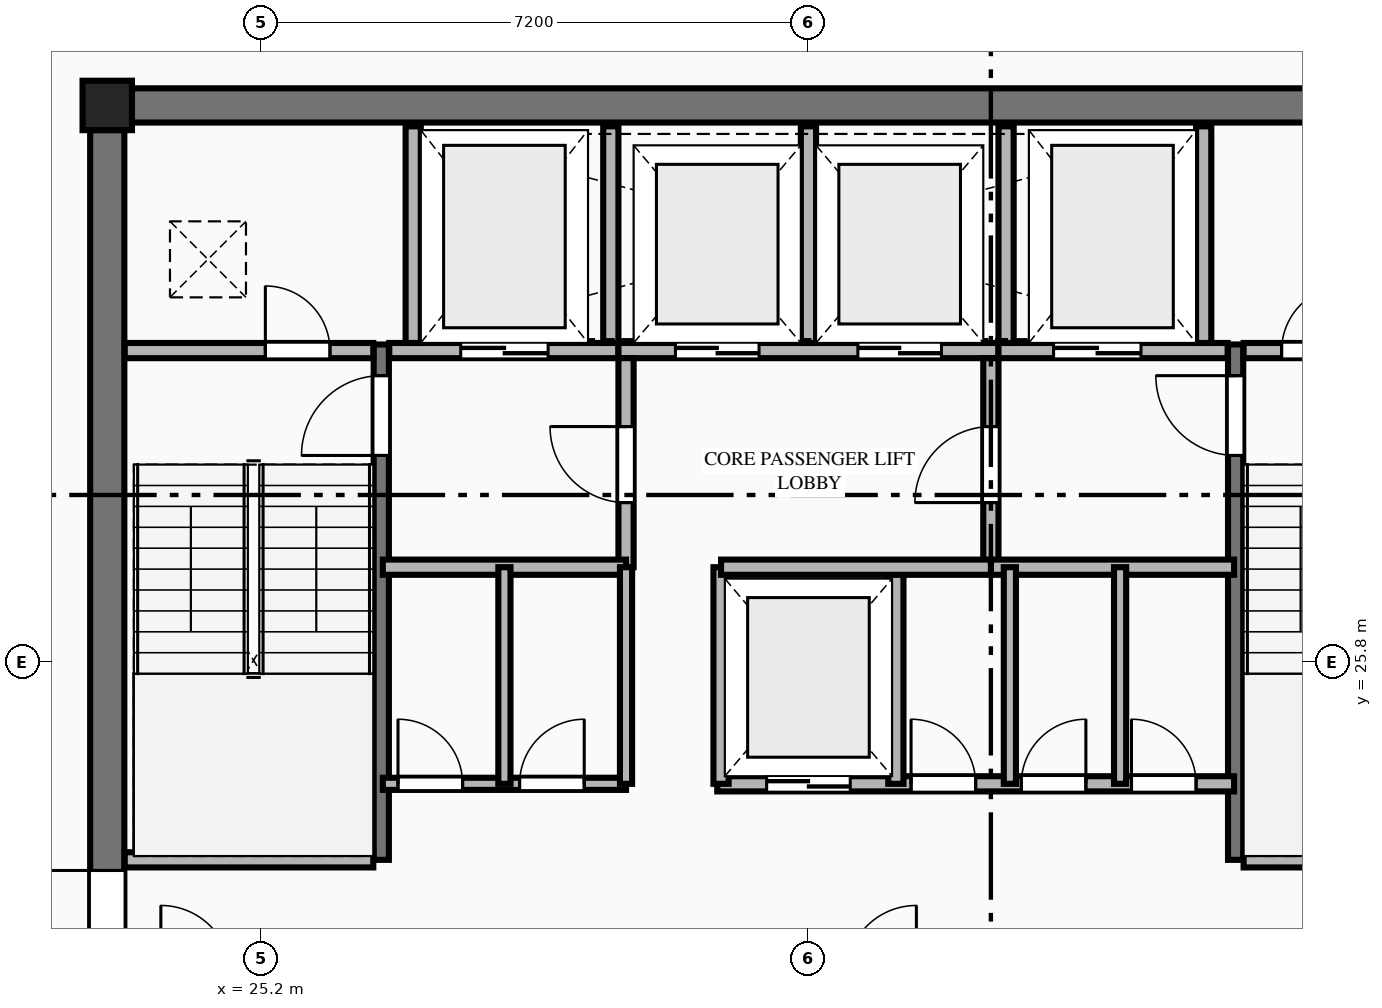
"""IFC4 building model, lengths in metres.
Left out: names, types, materials, properties, quantities, classifications, styles, units other than length and angle.
Written with IfcOpenShell. Run it as: python <this file> out.ifc"""

import sys

from ifc_helpers import new_model, si_unit, direction, frame, frame_2d, origin, origin_2d, place, context, subcontext, project, spatial, rectangle, extrude, element, fill, save


model = new_model("IFC4")
c1 = context("Model", 3, precision=1e-05, world=origin(), true_north=direction((0.0, 1.0)))
c2 = subcontext(c1, "Body", "Model", "MODEL_VIEW")
j1 = project(units=[si_unit("LENGTHUNIT", "METRE"), si_unit("PLANEANGLEUNIT", "RADIAN")], contexts=[c1])
p1 = place(None, origin())
s1 = spatial("IfcSite", under=j1, at=p1, CompositionType="ELEMENT")
p2 = place(p1, origin())
s2 = spatial("IfcBuilding", under=s1, at=p2, CompositionType="ELEMENT")
p3 = place(p2, frame((0.0, 0.0, 230.65)))
s3 = spatial("IfcBuildingStorey", under=s2, at=p3, CompositionType="ELEMENT", Elevation=230.65)
p4 = place(p3, frame((23.175, 33.125, 0.0), z_axis=(0.0, 0.0, 1.0), x_axis=(1.0, 0.0, 0.0)))
e1 = element("IfcColumn", 1, at=p4, inside=s3, PredefinedType="COLUMN", context=c2, shape_type="SweptSolid", body=[
    extrude(rectangle(XDim=0.65, YDim=0.65, at=origin_2d()), origin(), (0.0, 0.0, 1.0), 3.65),
])
p5 = place(p3, frame((23.5, 33.125, 0.0), z_axis=(0.0, 0.0, 1.0), x_axis=(1.0, 0.0, 0.0)))
e2 = element("IfcWall", 2, at=p5, inside=s3, PredefinedType="SHEAR", context=c2, shape_type="SweptSolid", body=[
    extrude(rectangle(XDim=17.8, YDim=0.45, at=frame_2d((8.9, 0.0))), origin(), (0.0, 0.0, 1.0), 3.45),
])
p6 = place(p3, frame((23.175, 19.0, 0.0), z_axis=(0.0, 0.0, 1.0), x_axis=(0.0, 1.0, 0.0)))
e3 = element("IfcWall", 3, at=p6, inside=s3, PredefinedType="SHEAR", context=c2, shape_type="SweptSolid", body=[
    extrude(rectangle(XDim=13.8, YDim=0.45, at=frame_2d((6.9, 0.0))), origin(), (0.0, 0.0, 1.0), 3.45),
])
p7 = place(p6, frame((2.84, 0.0, 0.0)))
e4 = element("IfcOpeningElement", 4, at=p7, cuts=e3, PredefinedType="OPENING", context=c2, shape_type="SweptSolid", body=[
    extrude(rectangle(XDim=1.22, YDim=2.25, at=frame_2d((0.61, 1.125))), frame((0.0, 0.235, 0.0), z_axis=(0.0, -1.0, 0.0), x_axis=(1.0, 0.0, 0.0)), (0.0, 0.0, 1.0), 0.47),
])
p8 = place(p3, frame((26.78, 23.2, 0.0), z_axis=(0.0, 0.0, 1.0), x_axis=(0.0, 1.0, 0.0)))
e5 = element("IfcWall", 5, at=p8, inside=s3, PredefinedType="SHEAR", context=c2, shape_type="SweptSolid", body=[
    extrude(rectangle(XDim=6.78, YDim=0.2, at=frame_2d((3.39, 0.0))), origin(), (0.0, 0.0, 1.0), 3.65),
])
p9 = place(p8, frame((5.32, 0.0, 0.0)))
e6 = element("IfcOpeningElement", 6, at=p9, cuts=e5, PredefinedType="OPENING", context=c2, shape_type="SweptSolid", body=[
    extrude(rectangle(XDim=1.05, YDim=2.15, at=frame_2d((0.525, 1.075))), frame((0.0, 0.11, 0.0), z_axis=(0.0, -1.0, 0.0), x_axis=(1.0, 0.0, 0.0)), (0.0, 0.0, 1.0), 0.22),
])
p10 = place(p3, frame((23.405, 23.2, 0.0), z_axis=(0.0, 0.0, 1.0), x_axis=(1.0, 0.0, 0.0)))
e7 = element("IfcWall", 7, at=p10, inside=s3, PredefinedType="PLUMBINGWALL", context=c2, shape_type="SweptSolid", body=[
    extrude(rectangle(XDim=3.27, YDim=0.2, at=frame_2d((1.635, 0.0))), origin(), (0.0, 0.0, 1.0), 3.45),
])
p11 = place(p3, frame((38.02, 23.2, 0.0), z_axis=(0.0, 0.0, 1.0), x_axis=(0.0, 1.0, 0.0)))
e8 = element("IfcWall", 8, at=p11, inside=s3, PredefinedType="SHEAR", context=c2, shape_type="SweptSolid", body=[
    extrude(rectangle(XDim=6.78, YDim=0.2, at=frame_2d((3.39, 0.0))), origin(), (0.0, 0.0, 1.0), 3.65),
])
p12 = place(p11, frame((5.32, 0.0, 0.0)))
e9 = element("IfcOpeningElement", 9, at=p12, cuts=e8, PredefinedType="OPENING", context=c2, shape_type="SweptSolid", body=[
    extrude(rectangle(XDim=1.05, YDim=2.15, at=frame_2d((0.525, 1.075))), frame((0.0, 0.11, 0.0), z_axis=(0.0, -1.0, 0.0), x_axis=(1.0, 0.0, 0.0)), (0.0, 0.0, 1.0), 0.22),
])
p13 = place(p3, frame((38.125, 23.2, 0.0), z_axis=(0.0, 0.0, 1.0), x_axis=(1.0, 0.0, 0.0)))
e10 = element("IfcWall", 10, at=p13, inside=s3, PredefinedType="PLUMBINGWALL", context=c2, shape_type="SweptSolid", body=[
    extrude(rectangle(XDim=3.27, YDim=0.2, at=frame_2d((1.635, 0.0))), origin(), (0.0, 0.0, 1.0), 3.45),
])
p14 = place(p3, frame((23.405, 29.9, 0.0), z_axis=(0.0, 0.0, 1.0), x_axis=(1.0, 0.0, 0.0)))
e11 = element("IfcWall", 11, at=p14, inside=s3, PredefinedType="PLUMBINGWALL", context=c2, shape_type="SweptSolid", body=[
    extrude(rectangle(XDim=3.27, YDim=0.2, at=frame_2d((1.635, 0.0))), origin(), (0.0, 0.0, 1.0), 3.45),
])
p15 = place(p14, frame((1.85, 0.0, 0.0)))
e12 = element("IfcOpeningElement", 12, at=p15, cuts=e11, PredefinedType="OPENING", context=c2, shape_type="SweptSolid", body=[
    extrude(rectangle(XDim=0.85, YDim=2.05, at=frame_2d((0.425, 1.025))), frame((0.0, 0.11, 0.0), z_axis=(0.0, -1.0, 0.0), x_axis=(1.0, 0.0, 0.0)), (0.0, 0.0, 1.0), 0.22),
])
p16 = place(p3, frame((26.885, 29.9, 0.0), z_axis=(0.0, 0.0, 1.0), x_axis=(1.0, 0.0, 0.0)))
e13 = element("IfcWall", 13, at=p16, inside=s3, PredefinedType="PLUMBINGWALL", context=c2, shape_type="SweptSolid", body=[
    extrude(rectangle(XDim=3.015, YDim=0.2, at=frame_2d((1.507, 0.0))), origin(), (0.0, 0.0, 1.0), 3.45),
])
p17 = place(p16, frame((0.94, 0.0, 0.0)))
e14 = element("IfcOpeningElement", 14, at=p17, cuts=e13, PredefinedType="OPENING", context=c2, shape_type="SweptSolid", body=[
    extrude(rectangle(XDim=1.15, YDim=2.2, at=frame_2d((0.575, 1.1))), frame((0.0, 0.11, 0.0), z_axis=(0.0, -1.0, 0.0), x_axis=(1.0, 0.0, 0.0)), (0.0, 0.0, 1.0), 0.22),
])
p18 = place(p3, frame((29.9, 29.9, 0.0), z_axis=(0.0, 0.0, 1.0), x_axis=(1.0, 0.0, 0.0)))
e15 = element("IfcWall", 15, at=p18, inside=s3, PredefinedType="PLUMBINGWALL", context=c2, shape_type="SweptSolid", body=[
    extrude(rectangle(XDim=5.0, YDim=0.2, at=frame_2d((2.5, 0.0))), origin(), (0.0, 0.0, 1.0), 3.45),
])
p19 = place(p18, frame((0.75, 0.0, 0.0)))
e16 = element("IfcOpeningElement", 16, at=p19, cuts=e15, PredefinedType="OPENING", context=c2, shape_type="SweptSolid", body=[
    extrude(rectangle(XDim=1.1, YDim=2.2, at=frame_2d((0.55, 1.1))), frame((0.0, 0.11, 0.0), z_axis=(0.0, -1.0, 0.0), x_axis=(1.0, 0.0, 0.0)), (0.0, 0.0, 1.0), 0.22),
])
p20 = place(p18, frame((3.15, 0.0, 0.0)))
e17 = element("IfcOpeningElement", 17, at=p20, cuts=e15, PredefinedType="OPENING", context=c2, shape_type="SweptSolid", body=[
    extrude(rectangle(XDim=1.1, YDim=2.2, at=frame_2d((0.55, 1.1))), frame((0.0, 0.11, 0.0), z_axis=(0.0, -1.0, 0.0), x_axis=(1.0, 0.0, 0.0)), (0.0, 0.0, 1.0), 0.22),
])
p21 = place(p3, frame((34.9, 29.9, 0.0), z_axis=(0.0, 0.0, 1.0), x_axis=(1.0, 0.0, 0.0)))
e18 = element("IfcWall", 18, at=p21, inside=s3, PredefinedType="PLUMBINGWALL", context=c2, shape_type="SweptSolid", body=[
    extrude(rectangle(XDim=3.015, YDim=0.2, at=frame_2d((1.508, 0.0))), origin(), (0.0, 0.0, 1.0), 3.45),
])
p22 = place(p21, frame((0.725, 0.0, 0.0)))
e19 = element("IfcOpeningElement", 19, at=p22, cuts=e18, PredefinedType="OPENING", context=c2, shape_type="SweptSolid", body=[
    extrude(rectangle(XDim=1.15, YDim=2.2, at=frame_2d((0.575, 1.1))), frame((0.0, 0.11, 0.0), z_axis=(0.0, -1.0, 0.0), x_axis=(1.0, 0.0, 0.0)), (0.0, 0.0, 1.0), 0.22),
])
p23 = place(p3, frame((38.125, 29.9, 0.0), z_axis=(0.0, 0.0, 1.0), x_axis=(1.0, 0.0, 0.0)))
e20 = element("IfcWall", 20, at=p23, inside=s3, PredefinedType="PLUMBINGWALL", context=c2, shape_type="SweptSolid", body=[
    extrude(rectangle(XDim=3.27, YDim=0.2, at=frame_2d((1.635, 0.0))), origin(), (0.0, 0.0, 1.0), 3.45),
])
p24 = place(p23, frame((0.5, 0.0, 0.0)))
e21 = element("IfcOpeningElement", 21, at=p24, cuts=e20, PredefinedType="OPENING", context=c2, shape_type="SweptSolid", body=[
    extrude(rectangle(XDim=0.85, YDim=2.05, at=frame_2d((0.425, 1.025))), frame((0.0, 0.11, 0.0), z_axis=(0.0, -1.0, 0.0), x_axis=(1.0, 0.0, 0.0)), (0.0, 0.0, 1.0), 0.22),
])
for number, where, z_axis, x_axis in (
    (22, (27.2, 30.0, 0.0), (0.0, 0.0, 1.0), (0.0, 1.0, 0.0)),
    (23, (29.8, 30.0, 0.0), (0.0, 0.0, 1.0), (0.0, 1.0, 0.0)),
    (24, (32.4, 30.0, 0.0), (0.0, 0.0, 1.0), (0.0, 1.0, 0.0)),
    (25, (35.0, 30.0, 0.0), (0.0, 0.0, 1.0), (0.0, 1.0, 0.0)),
    (26, (37.6, 30.0, 0.0), (0.0, 0.0, 1.0), (0.0, 1.0, 0.0)),
):
    element("IfcWall", number, at=place(p3, frame(where, z_axis=z_axis, x_axis=x_axis)), inside=s3, PredefinedType="PLUMBINGWALL", context=c2, shape_type="SweptSolid", body=[
        extrude(rectangle(XDim=2.85, YDim=0.2, at=frame_2d((1.425, 0.0))), origin(), (0.0, 0.0, 1.0), 3.45),
    ])
p25 = place(p3, frame((30.0, 27.05, 0.0), z_axis=(0.0, 0.0, 1.0), x_axis=(0.0, 1.0, 0.0)))
e27 = element("IfcWall", 27, at=p25, inside=s3, PredefinedType="PLUMBINGWALL", context=c2, shape_type="SweptSolid", body=[
    extrude(rectangle(XDim=2.75, YDim=0.2, at=frame_2d((1.375, 0.0))), origin(), (0.0, 0.0, 1.0), 3.45),
])
p26 = place(p25, frame((0.85, 0.0, 0.0)))
e28 = element("IfcOpeningElement", 28, at=p26, cuts=e27, PredefinedType="OPENING", context=c2, shape_type="SweptSolid", body=[
    extrude(rectangle(XDim=1.0, YDim=2.15, at=frame_2d((0.5, 1.075))), frame((0.0, 0.11, 0.0), z_axis=(0.0, -1.0, 0.0), x_axis=(1.0, 0.0, 0.0)), (0.0, 0.0, 1.0), 0.22),
])
p27 = place(p3, frame((26.8, 27.05, 0.0), z_axis=(0.0, 0.0, 1.0), x_axis=(1.0, 0.0, 0.0)))
e29 = element("IfcWall", 29, at=p27, inside=s3, PredefinedType="PLUMBINGWALL", context=c2, shape_type="SweptSolid", body=[
    extrude(rectangle(XDim=3.2, YDim=0.2, at=frame_2d((1.6, 0.0))), origin(), (0.0, 0.0, 1.0), 3.45),
])
p28 = place(p3, frame((34.8, 27.05, 0.0), z_axis=(0.0, 0.0, 1.0), x_axis=(0.0, 1.0, 0.0)))
e30 = element("IfcWall", 30, at=p28, inside=s3, PredefinedType="PLUMBINGWALL", context=c2, shape_type="SweptSolid", body=[
    extrude(rectangle(XDim=2.75, YDim=0.2, at=frame_2d((1.375, 0.0))), origin(), (0.0, 0.0, 1.0), 3.45),
])
p29 = place(p28, frame((0.85, 0.0, 0.0)))
e31 = element("IfcOpeningElement", 31, at=p29, cuts=e30, PredefinedType="OPENING", context=c2, shape_type="SweptSolid", body=[
    extrude(rectangle(XDim=1.0, YDim=2.15, at=frame_2d((0.5, 1.075))), frame((0.0, 0.11, 0.0), z_axis=(0.0, -1.0, 0.0), x_axis=(1.0, 0.0, 0.0)), (0.0, 0.0, 1.0), 0.22),
])
p30 = place(p3, frame((34.8, 27.05, 0.0), z_axis=(0.0, 0.0, 1.0), x_axis=(1.0, 0.0, 0.0)))
e32 = element("IfcWall", 32, at=p30, inside=s3, PredefinedType="PLUMBINGWALL", context=c2, shape_type="SweptSolid", body=[
    extrude(rectangle(XDim=3.2, YDim=0.2, at=frame_2d((1.6, 0.0))), origin(), (0.0, 0.0, 1.0), 3.45),
])
p31 = place(p3, frame((26.8, 24.2, 0.0), z_axis=(0.0, 0.0, 1.0), x_axis=(1.0, 0.0, 0.0)))
e33 = element("IfcWall", 33, at=p31, inside=s3, PredefinedType="PARTITIONING", context=c2, shape_type="SweptSolid", body=[
    extrude(rectangle(XDim=3.2, YDim=0.16, at=frame_2d((1.6, 0.0))), origin(), (0.0, 0.0, 1.0), 3.45),
])
p32 = place(p31, frame((0.2, 0.0, 0.0)))
e34 = element("IfcOpeningElement", 34, at=p32, cuts=e33, PredefinedType="OPENING", context=c2, shape_type="SweptSolid", body=[
    extrude(rectangle(XDim=0.85, YDim=2.05, at=frame_2d((0.425, 1.025))), frame((0.0, 0.09, 0.0), z_axis=(0.0, -1.0, 0.0), x_axis=(1.0, 0.0, 0.0)), (0.0, 0.0, 1.0), 0.18),
])
p33 = place(p31, frame((1.8, 0.0, 0.0)))
e35 = element("IfcOpeningElement", 35, at=p33, cuts=e33, PredefinedType="OPENING", context=c2, shape_type="SweptSolid", body=[
    extrude(rectangle(XDim=0.85, YDim=2.05, at=frame_2d((0.425, 1.025))), frame((0.0, 0.09, 0.0), z_axis=(0.0, -1.0, 0.0), x_axis=(1.0, 0.0, 0.0)), (0.0, 0.0, 1.0), 0.18),
])
p34 = place(p3, frame((30.0, 24.2, 0.0), z_axis=(0.0, 0.0, 1.0), x_axis=(0.0, 1.0, 0.0)))
e36 = element("IfcWall", 36, at=p34, inside=s3, PredefinedType="PARTITIONING", context=c2, shape_type="SweptSolid", body=[
    extrude(rectangle(XDim=2.85, YDim=0.16, at=frame_2d((1.425, 0.0))), origin(), (0.0, 0.0, 1.0), 3.45),
])
p35 = place(p3, frame((31.2, 24.2, 0.0), z_axis=(0.0, 0.0, 1.0), x_axis=(1.0, 0.0, 0.0)))
e37 = element("IfcWall", 37, at=p35, inside=s3, PredefinedType="PLUMBINGWALL", context=c2, shape_type="SweptSolid", body=[
    extrude(rectangle(XDim=6.8, YDim=0.2, at=frame_2d((3.4, 0.0))), origin(), (0.0, 0.0, 1.0), 3.45),
])
p36 = place(p35, frame((0.65, 0.0, 0.0)))
e38 = element("IfcOpeningElement", 38, at=p36, cuts=e37, PredefinedType="OPENING", context=c2, shape_type="SweptSolid", body=[
    extrude(rectangle(XDim=1.1, YDim=2.2, at=frame_2d((0.55, 1.1))), frame((0.0, 0.11, 0.0), z_axis=(0.0, -1.0, 0.0), x_axis=(1.0, 0.0, 0.0)), (0.0, 0.0, 1.0), 0.22),
])
p37 = place(p35, frame((2.55, 0.0, 0.0)))
e39 = element("IfcOpeningElement", 39, at=p37, cuts=e37, PredefinedType="OPENING", context=c2, shape_type="SweptSolid", body=[
    extrude(rectangle(XDim=0.85, YDim=2.05, at=frame_2d((0.425, 1.025))), frame((0.0, 0.11, 0.0), z_axis=(0.0, -1.0, 0.0), x_axis=(1.0, 0.0, 0.0)), (0.0, 0.0, 1.0), 0.22),
])
p38 = place(p35, frame((4.0, 0.0, 0.0)))
e40 = element("IfcOpeningElement", 40, at=p38, cuts=e37, PredefinedType="OPENING", context=c2, shape_type="SweptSolid", body=[
    extrude(rectangle(XDim=0.85, YDim=2.05, at=frame_2d((0.425, 1.025))), frame((0.0, 0.11, 0.0), z_axis=(0.0, -1.0, 0.0), x_axis=(1.0, 0.0, 0.0)), (0.0, 0.0, 1.0), 0.22),
])
p39 = place(p35, frame((5.45, 0.0, 0.0)))
e41 = element("IfcOpeningElement", 41, at=p39, cuts=e37, PredefinedType="OPENING", context=c2, shape_type="SweptSolid", body=[
    extrude(rectangle(XDim=0.85, YDim=2.05, at=frame_2d((0.425, 1.025))), frame((0.0, 0.11, 0.0), z_axis=(0.0, -1.0, 0.0), x_axis=(1.0, 0.0, 0.0)), (0.0, 0.0, 1.0), 0.22),
])
for number, where, z_axis, x_axis in (
    (42, (31.25, 24.2, 0.0), (0.0, 0.0, 1.0), (0.0, 1.0, 0.0)),
    (43, (33.55, 24.2, 0.0), (0.0, 0.0, 1.0), (0.0, 1.0, 0.0)),
):
    element("IfcWall", number, at=place(p3, frame(where, z_axis=z_axis, x_axis=x_axis)), inside=s3, PredefinedType="PLUMBINGWALL", context=c2, shape_type="SweptSolid", body=[
        extrude(rectangle(XDim=2.85, YDim=0.2, at=frame_2d((1.425, 0.0))), origin(), (0.0, 0.0, 1.0), 3.45),
    ])
p40 = place(p3, frame((31.25, 27.05, 0.0), z_axis=(0.0, 0.0, 1.0), x_axis=(1.0, 0.0, 0.0)))
e44 = element("IfcWall", 44, at=p40, inside=s3, PredefinedType="PLUMBINGWALL", context=c2, shape_type="SweptSolid", body=[
    extrude(rectangle(XDim=3.55, YDim=0.2, at=frame_2d((1.775, 0.0))), origin(), (0.0, 0.0, 1.0), 3.45),
])
for number, where, z_axis, x_axis in (
    (45, (28.4, 24.2, 0.0), (0.0, 0.0, 1.0), (0.0, 1.0, 0.0)),
    (46, (35.05, 24.2, 0.0), (0.0, 0.0, 1.0), (0.0, 1.0, 0.0)),
    (47, (36.5, 24.2, 0.0), (0.0, 0.0, 1.0), (0.0, 1.0, 0.0)),
):
    element("IfcWall", number, at=place(p3, frame(where, z_axis=z_axis, x_axis=x_axis)), inside=s3, PredefinedType="PARTITIONING", context=c2, shape_type="SweptSolid", body=[
        extrude(rectangle(XDim=2.85, YDim=0.16, at=frame_2d((1.425, 0.0))), origin(), (0.0, 0.0, 1.0), 3.45),
    ])
p41 = place(p7, origin())
e48 = element("IfcDoor", 48, at=p41, inside=s3, OperationType="SINGLE_SWING_RIGHT", PredefinedType="DOOR", context=c2, shape_type="SweptSolid", body=[
    extrude(rectangle(XDim=1.22, YDim=2.25, at=frame_2d((0.61, 1.125))), frame((0.0, 0.025, 0.0), z_axis=(0.0, -1.0, 0.0), x_axis=(1.0, 0.0, 0.0)), (0.0, 0.0, 1.0), 0.05),
])
fill(e4, e48)
p42 = place(p9, origin())
e49 = element("IfcDoor", 49, at=p42, inside=s3, OperationType="SINGLE_SWING_LEFT", PredefinedType="DOOR", context=c2, shape_type="SweptSolid", body=[
    extrude(rectangle(XDim=1.05, YDim=2.15, at=frame_2d((0.525, 1.075))), frame((0.0, 0.025, 0.0), z_axis=(0.0, -1.0, 0.0), x_axis=(1.0, 0.0, 0.0)), (0.0, 0.0, 1.0), 0.05),
])
fill(e6, e49)
p43 = place(p12, origin())
e50 = element("IfcDoor", 50, at=p43, inside=s3, OperationType="SINGLE_SWING_RIGHT", PredefinedType="DOOR", context=c2, shape_type="SweptSolid", body=[
    extrude(rectangle(XDim=1.05, YDim=2.15, at=frame_2d((0.525, 1.075))), frame((0.0, 0.025, 0.0), z_axis=(0.0, -1.0, 0.0), x_axis=(1.0, 0.0, 0.0)), (0.0, 0.0, 1.0), 0.05),
])
fill(e9, e50)
p44 = place(p15, origin())
e51 = element("IfcDoor", 51, at=p44, inside=s3, OperationType="SINGLE_SWING_LEFT", PredefinedType="DOOR", context=c2, shape_type="SweptSolid", body=[
    extrude(rectangle(XDim=0.85, YDim=2.05, at=frame_2d((0.425, 1.025))), frame((0.0, 0.025, 0.0), z_axis=(0.0, -1.0, 0.0), x_axis=(1.0, 0.0, 0.0)), (0.0, 0.0, 1.0), 0.05),
])
fill(e12, e51)
p45 = place(p24, origin())
e52 = element("IfcDoor", 52, at=p45, inside=s3, OperationType="SINGLE_SWING_RIGHT", PredefinedType="DOOR", context=c2, shape_type="SweptSolid", body=[
    extrude(rectangle(XDim=0.85, YDim=2.05, at=frame_2d((0.425, 1.025))), frame((0.0, 0.025, 0.0), z_axis=(0.0, -1.0, 0.0), x_axis=(1.0, 0.0, 0.0)), (0.0, 0.0, 1.0), 0.05),
])
fill(e21, e52)
p46 = place(p17, origin())
e53 = element("IfcDoor", 53, at=p46, inside=s3, OperationType="DOUBLE_DOOR_SLIDING", PredefinedType="DOOR", context=c2, shape_type="SweptSolid", body=[
    extrude(rectangle(XDim=1.15, YDim=2.2, at=frame_2d((0.575, 1.1))), frame((0.0, 0.025, 0.0), z_axis=(0.0, -1.0, 0.0), x_axis=(1.0, 0.0, 0.0)), (0.0, 0.0, 1.0), 0.05),
])
fill(e14, e53)
p47 = place(p22, origin())
e54 = element("IfcDoor", 54, at=p47, inside=s3, OperationType="DOUBLE_DOOR_SLIDING", PredefinedType="DOOR", context=c2, shape_type="SweptSolid", body=[
    extrude(rectangle(XDim=1.15, YDim=2.2, at=frame_2d((0.575, 1.1))), frame((0.0, 0.025, 0.0), z_axis=(0.0, -1.0, 0.0), x_axis=(1.0, 0.0, 0.0)), (0.0, 0.0, 1.0), 0.05),
])
fill(e19, e54)
p48 = place(p19, origin())
e55 = element("IfcDoor", 55, at=p48, inside=s3, OperationType="DOUBLE_DOOR_SLIDING", PredefinedType="DOOR", context=c2, shape_type="SweptSolid", body=[
    extrude(rectangle(XDim=1.1, YDim=2.2, at=frame_2d((0.55, 1.1))), frame((0.0, 0.025, 0.0), z_axis=(0.0, -1.0, 0.0), x_axis=(1.0, 0.0, 0.0)), (0.0, 0.0, 1.0), 0.05),
])
fill(e16, e55)
p49 = place(p20, origin())
e56 = element("IfcDoor", 56, at=p49, inside=s3, OperationType="DOUBLE_DOOR_SLIDING", PredefinedType="DOOR", context=c2, shape_type="SweptSolid", body=[
    extrude(rectangle(XDim=1.1, YDim=2.2, at=frame_2d((0.55, 1.1))), frame((0.0, 0.025, 0.0), z_axis=(0.0, -1.0, 0.0), x_axis=(1.0, 0.0, 0.0)), (0.0, 0.0, 1.0), 0.05),
])
fill(e17, e56)
p50 = place(p26, origin())
e57 = element("IfcDoor", 57, at=p50, inside=s3, OperationType="SINGLE_SWING_RIGHT", PredefinedType="DOOR", context=c2, shape_type="SweptSolid", body=[
    extrude(rectangle(XDim=1.0, YDim=2.15, at=frame_2d((0.5, 1.075))), frame((0.0, 0.025, 0.0), z_axis=(0.0, -1.0, 0.0), x_axis=(1.0, 0.0, 0.0)), (0.0, 0.0, 1.0), 0.05),
])
fill(e28, e57)
p51 = place(p29, origin())
e58 = element("IfcDoor", 58, at=p51, inside=s3, OperationType="SINGLE_SWING_LEFT", PredefinedType="DOOR", context=c2, shape_type="SweptSolid", body=[
    extrude(rectangle(XDim=1.0, YDim=2.15, at=frame_2d((0.5, 1.075))), frame((0.0, 0.025, 0.0), z_axis=(0.0, -1.0, 0.0), x_axis=(1.0, 0.0, 0.0)), (0.0, 0.0, 1.0), 0.05),
])
fill(e31, e58)
p52 = place(p36, origin())
e59 = element("IfcDoor", 59, at=p52, inside=s3, OperationType="DOUBLE_DOOR_SLIDING", PredefinedType="DOOR", context=c2, shape_type="SweptSolid", body=[
    extrude(rectangle(XDim=1.1, YDim=2.2, at=frame_2d((0.55, 1.1))), frame((0.0, 0.025, 0.0), z_axis=(0.0, -1.0, 0.0), x_axis=(1.0, 0.0, 0.0)), (0.0, 0.0, 1.0), 0.05),
])
fill(e38, e59)
p53 = place(p32, origin())
e60 = element("IfcDoor", 60, at=p53, inside=s3, OperationType="SINGLE_SWING_LEFT", PredefinedType="DOOR", context=c2, shape_type="SweptSolid", body=[
    extrude(rectangle(XDim=0.85, YDim=2.05, at=frame_2d((0.425, 1.025))), frame((0.0, 0.025, 0.0), z_axis=(0.0, -1.0, 0.0), x_axis=(1.0, 0.0, 0.0)), (0.0, 0.0, 1.0), 0.05),
])
fill(e34, e60)
p54 = place(p33, origin())
e61 = element("IfcDoor", 61, at=p54, inside=s3, OperationType="SINGLE_SWING_RIGHT", PredefinedType="DOOR", context=c2, shape_type="SweptSolid", body=[
    extrude(rectangle(XDim=0.85, YDim=2.05, at=frame_2d((0.425, 1.025))), frame((0.0, 0.025, 0.0), z_axis=(0.0, -1.0, 0.0), x_axis=(1.0, 0.0, 0.0)), (0.0, 0.0, 1.0), 0.05),
])
fill(e35, e61)
p55 = place(p37, origin())
e62 = element("IfcDoor", 62, at=p55, inside=s3, OperationType="SINGLE_SWING_LEFT", PredefinedType="DOOR", context=c2, shape_type="SweptSolid", body=[
    extrude(rectangle(XDim=0.85, YDim=2.05, at=frame_2d((0.425, 1.025))), frame((0.0, 0.025, 0.0), z_axis=(0.0, -1.0, 0.0), x_axis=(1.0, 0.0, 0.0)), (0.0, 0.0, 1.0), 0.05),
])
fill(e39, e62)
p56 = place(p38, origin())
e63 = element("IfcDoor", 63, at=p56, inside=s3, OperationType="SINGLE_SWING_RIGHT", PredefinedType="DOOR", context=c2, shape_type="SweptSolid", body=[
    extrude(rectangle(XDim=0.85, YDim=2.05, at=frame_2d((0.425, 1.025))), frame((0.0, 0.025, 0.0), z_axis=(0.0, -1.0, 0.0), x_axis=(1.0, 0.0, 0.0)), (0.0, 0.0, 1.0), 0.05),
])
fill(e40, e63)
p57 = place(p39, origin())
e64 = element("IfcDoor", 64, at=p57, inside=s3, OperationType="SINGLE_SWING_LEFT", PredefinedType="DOOR", context=c2, shape_type="SweptSolid", body=[
    extrude(rectangle(XDim=0.85, YDim=2.05, at=frame_2d((0.425, 1.025))), frame((0.0, 0.025, 0.0), z_axis=(0.0, -1.0, 0.0), x_axis=(1.0, 0.0, 0.0)), (0.0, 0.0, 1.0), 0.05),
])
fill(e41, e64)
save(model, sys.argv[1])
